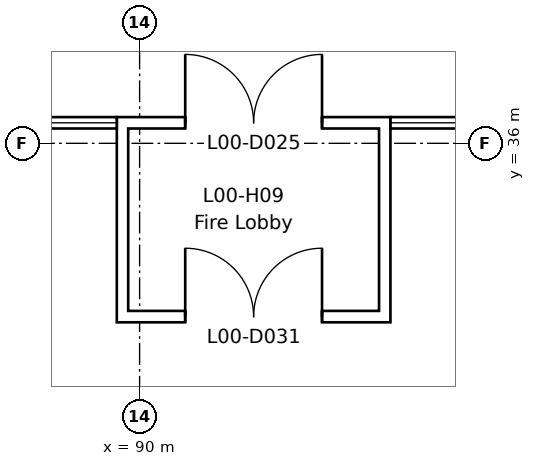
"""IFC4 building model, lengths in metres.
Left out: names, types, materials, properties, quantities, classifications, styles, units other than length and angle.
Written with IfcOpenShell. Run it as: python <this file> out.ifc"""

import sys

from ifc_helpers import new_model, si_unit, direction, frame, frame_2d, origin, place, context, subcontext, project, spatial, rectangle, extrude, element, fill, save


model = new_model("IFC4")
c1 = context("Model", 3, precision=1e-05, world=origin(), true_north=direction((0.0, 1.0)))
c2 = subcontext(c1, "Body", "Model", "MODEL_VIEW")
j1 = project(units=[si_unit("LENGTHUNIT", "METRE"), si_unit("PLANEANGLEUNIT", "RADIAN")], contexts=[c1])
p1 = place(None, origin())
s1 = spatial("IfcSite", under=j1, at=p1, CompositionType="ELEMENT")
p2 = place(p1, origin())
s2 = spatial("IfcBuilding", under=s1, at=p2, CompositionType="ELEMENT")
p3 = place(p2, origin())
s3 = spatial("IfcBuildingStorey", under=s2, at=p3, CompositionType="ELEMENT", Elevation=0.0)
p4 = place(p3, frame((89.7, 36.27, 0.0), z_axis=(0.0, 0.0, 1.0), x_axis=(1.0, 0.0, 0.0)))
e1 = element("IfcWall", 1, at=p4, inside=s3, PredefinedType="STANDARD", context=c2, shape_type="SweptSolid", body=[
    extrude(rectangle(XDim=3.6, YDim=0.15, at=frame_2d((1.8, 0.0))), origin(), (0.0, 0.0, 1.0), 4.8),
])
p5 = place(p4, frame((0.9, 0.0, 0.0)))
e2 = element("IfcOpeningElement", 2, at=p5, cuts=e1, PredefinedType="OPENING", context=c2, shape_type="SweptSolid", body=[
    extrude(rectangle(XDim=1.8, YDim=2.4, at=frame_2d((0.9, 1.2))), frame((0.0, 0.085, 0.0), z_axis=(0.0, -1.0, 0.0), x_axis=(1.0, 0.0, 0.0)), (0.0, 0.0, 1.0), 0.17),
])
for number, where, z_axis, x_axis in (
    (3, (89.775, 33.795, 0.0), (0.0, 0.0, 1.0), (0.0, 1.0, 0.0)),
    (4, (93.225, 33.795, 0.0), (0.0, 0.0, 1.0), (0.0, 1.0, 0.0)),
):
    element("IfcWall", number, at=place(p3, frame(where, z_axis=z_axis, x_axis=x_axis)), inside=s3, PredefinedType="STANDARD", context=c2, shape_type="SweptSolid", body=[
        extrude(rectangle(XDim=2.4, YDim=0.15, at=frame_2d((1.2, 0.0))), origin(), (0.0, 0.0, 1.0), 3.0),
    ])
p6 = place(p3, frame((89.7, 33.72, 0.0), z_axis=(0.0, 0.0, 1.0), x_axis=(1.0, 0.0, 0.0)))
e5 = element("IfcWall", 5, at=p6, inside=s3, PredefinedType="STANDARD", context=c2, shape_type="SweptSolid", body=[
    extrude(rectangle(XDim=3.6, YDim=0.15, at=frame_2d((1.8, 0.0))), origin(), (0.0, 0.0, 1.0), 3.0),
])
p7 = place(p6, frame((0.9, 0.0, 0.0)))
e6 = element("IfcOpeningElement", 6, at=p7, cuts=e5, PredefinedType="OPENING", context=c2, shape_type="SweptSolid", body=[
    extrude(rectangle(XDim=1.8, YDim=2.4, at=frame_2d((0.9, 1.2))), frame((0.0, 0.085, 0.0), z_axis=(0.0, -1.0, 0.0), x_axis=(1.0, 0.0, 0.0)), (0.0, 0.0, 1.0), 0.17),
])
p8 = place(p5, origin())
e7 = element("IfcDoor", 7, at=p8, inside=s3, OperationType="DOUBLE_DOOR_SINGLE_SWING", PredefinedType="DOOR", context=c2, shape_type="SweptSolid", body=[
    extrude(rectangle(XDim=1.8, YDim=2.4, at=frame_2d((0.9, 1.2))), frame((0.0, 0.025, 0.0), z_axis=(0.0, -1.0, 0.0), x_axis=(1.0, 0.0, 0.0)), (0.0, 0.0, 1.0), 0.05),
])
fill(e2, e7)
p9 = place(p7, origin())
e8 = element("IfcDoor", 8, at=p9, inside=s3, OperationType="DOUBLE_DOOR_SINGLE_SWING", PredefinedType="DOOR", context=c2, shape_type="SweptSolid", body=[
    extrude(rectangle(XDim=1.8, YDim=2.4, at=frame_2d((0.9, 1.2))), frame((0.0, 0.025, 0.0), z_axis=(0.0, -1.0, 0.0), x_axis=(1.0, 0.0, 0.0)), (0.0, 0.0, 1.0), 0.05),
])
fill(e6, e8)
save(model, sys.argv[1])
